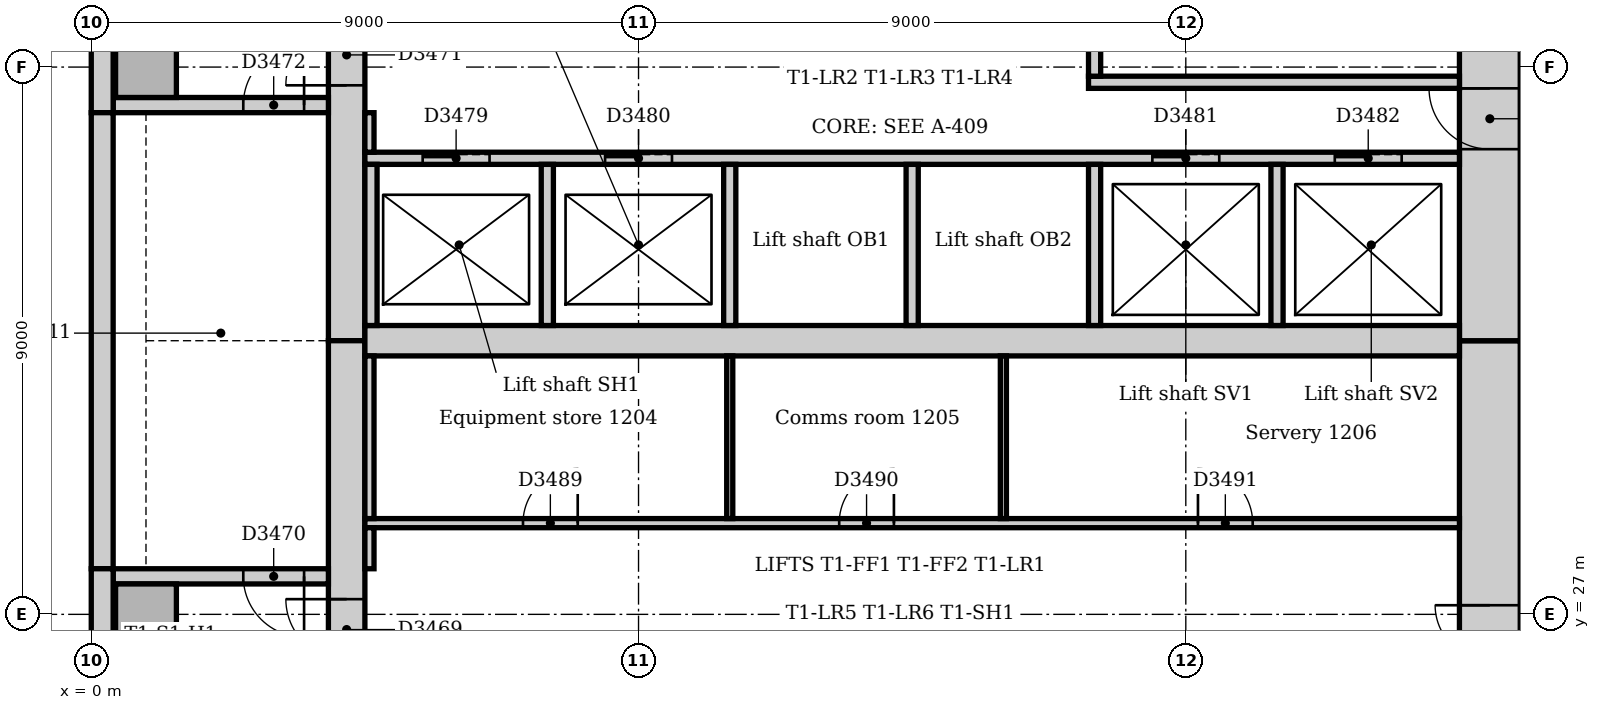
"""IFC4 building model, lengths in metres.
Left out: names, types, materials, properties, quantities, classifications, styles, units other than length and angle.
Written with IfcOpenShell. Run it as: python <this file> out.ifc"""

import sys

from ifc_helpers import new_model, si_unit, direction, frame, frame_2d, origin, origin_2d, place, context, subcontext, project, spatial, rectangle, extrude, element, fill, save


model = new_model("IFC4")
c1 = context("Model", 3, precision=1e-05, world=origin(), true_north=direction((0.0, 1.0)))
c2 = subcontext(c1, "Body", "Model", "MODEL_VIEW")
j1 = project(units=[si_unit("LENGTHUNIT", "METRE"), si_unit("PLANEANGLEUNIT", "RADIAN")], contexts=[c1])
p1 = place(None, origin())
s1 = spatial("IfcSite", under=j1, at=p1, CompositionType="ELEMENT")
p2 = place(p1, origin())
s2 = spatial("IfcBuilding", under=s1, at=p2, CompositionType="ELEMENT")
p3 = place(p2, frame((0.0, 0.0, 55.0)))
s3 = spatial("IfcBuildingStorey", under=s2, at=p3, CompositionType="ELEMENT", Elevation=55.0)
p4 = place(p3, frame((23.0, 21.0, 0.0), z_axis=(0.0, 0.0, 1.0), x_axis=(0.0, 1.0, 0.0)))
e1 = element("IfcWall", 1, at=p4, inside=s3, PredefinedType="SOLIDWALL", context=c2, shape_type="SweptSolid", body=[
    extrude(rectangle(XDim=10.5, YDim=1.0, at=frame_2d((5.25, 0.0))), origin(), (0.0, 0.0, 1.0), 4.0),
])
p5 = place(p4, frame((4.35, 0.0, 0.0)))
e2 = element("IfcOpeningElement", 2, at=p5, cuts=e1, PredefinedType="OPENING", context=c2, shape_type="SweptSolid", body=[
    extrude(rectangle(XDim=1.8, YDim=2.1, at=frame_2d((0.9, 1.05))), frame((0.0, 0.51, 0.0), z_axis=(0.0, -1.0, 0.0), x_axis=(1.0, 0.0, 0.0)), (0.0, 0.0, 1.0), 1.02),
])
p6 = place(p3, frame((23.0, 31.5, 0.0), z_axis=(0.0, 0.0, 1.0), x_axis=(0.0, 1.0, 0.0)))
e3 = element("IfcWall", 3, at=p6, inside=s3, PredefinedType="SOLIDWALL", context=c2, shape_type="SweptSolid", body=[
    extrude(rectangle(XDim=10.5, YDim=1.0, at=frame_2d((5.25, 0.0))), origin(), (0.0, 0.0, 1.0), 4.0),
])
p7 = place(p6, frame((3.15, 0.0, 0.0)))
e4 = element("IfcOpeningElement", 4, at=p7, cuts=e3, PredefinedType="OPENING", context=c2, shape_type="SweptSolid", body=[
    extrude(rectangle(XDim=1.0, YDim=2.1, at=frame_2d((0.5, 1.05))), frame((0.0, 0.51, 0.0), z_axis=(0.0, -1.0, 0.0), x_axis=(1.0, 0.0, 0.0)), (0.0, 0.0, 1.0), 1.02),
])
p8 = place(p6, frame((5.2, 0.0, 0.0)))
e5 = element("IfcOpeningElement", 5, at=p8, cuts=e3, PredefinedType="OPENING", context=c2, shape_type="SweptSolid", body=[
    extrude(rectangle(XDim=1.0, YDim=2.1, at=frame_2d((0.5, 1.05))), frame((0.0, 0.51, 0.0), z_axis=(0.0, -1.0, 0.0), x_axis=(1.0, 0.0, 0.0)), (0.0, 0.0, 1.0), 1.02),
])
p9 = place(p3, frame((4.2, 42.0, 0.0), z_axis=(0.0, 0.0, 1.0), x_axis=(0.0, -1.0, 0.0)))
e6 = element("IfcWall", 6, at=p9, inside=s3, PredefinedType="SOLIDWALL", context=c2, shape_type="SweptSolid", body=[
    extrude(rectangle(XDim=10.5, YDim=0.6, at=frame_2d((5.25, 0.0))), origin(), (0.0, 0.0, 1.0), 4.0),
])
p10 = place(p9, frame((5.3, 0.0, 0.0)))
e7 = element("IfcOpeningElement", 7, at=p10, cuts=e6, PredefinedType="OPENING", context=c2, shape_type="SweptSolid", body=[
    extrude(rectangle(XDim=1.0, YDim=2.1, at=frame_2d((0.5, 1.05))), frame((0.0, 0.31, 0.0), z_axis=(0.0, -1.0, 0.0), x_axis=(1.0, 0.0, 0.0)), (0.0, 0.0, 1.0), 0.62),
])
p11 = place(p3, frame((4.2, 31.5, 0.0), z_axis=(0.0, 0.0, 1.0), x_axis=(0.0, -1.0, 0.0)))
e8 = element("IfcWall", 8, at=p11, inside=s3, PredefinedType="SOLIDWALL", context=c2, shape_type="SweptSolid", body=[
    extrude(rectangle(XDim=10.5, YDim=0.6, at=frame_2d((5.25, 0.0))), origin(), (0.0, 0.0, 1.0), 4.0),
])
p12 = place(p11, frame((4.25, 0.0, 0.0)))
e9 = element("IfcOpeningElement", 9, at=p12, cuts=e8, PredefinedType="OPENING", context=c2, shape_type="SweptSolid", body=[
    extrude(rectangle(XDim=1.0, YDim=2.1, at=frame_2d((0.5, 1.05))), frame((0.0, 0.31, 0.0), z_axis=(0.0, -1.0, 0.0), x_axis=(1.0, 0.0, 0.0)), (0.0, 0.0, 1.0), 0.62),
])
p13 = place(p3, frame((4.5, 31.5, 0.0), z_axis=(0.0, 0.0, 1.0), x_axis=(1.0, 0.0, 0.0)))
e10 = element("IfcWall", 10, at=p13, inside=s3, PredefinedType="SOLIDWALL", context=c2, shape_type="SweptSolid", body=[
    extrude(rectangle(XDim=18.0, YDim=0.5, at=frame_2d((9.0, 0.0))), origin(), (0.0, 0.0, 1.0), 4.0),
])
p14 = place(p3, frame((3.9, 27.625, 0.0), z_axis=(0.0, 0.0, 1.0), x_axis=(-1.0, 0.0, 0.0)))
e11 = element("IfcWall", 11, at=p14, inside=s3, PredefinedType="SOLIDWALL", context=c2, shape_type="SweptSolid", body=[
    extrude(rectangle(XDim=3.54, YDim=0.25, at=frame_2d((1.77, 0.0))), origin(), (0.0, 0.0, 1.0), 4.0),
])
p15 = place(p14, frame((0.4, 0.0, 0.0)))
e12 = element("IfcOpeningElement", 12, at=p15, cuts=e11, PredefinedType="OPENING", context=c2, shape_type="SweptSolid", body=[
    extrude(rectangle(XDim=1.0, YDim=2.1, at=frame_2d((0.5, 1.05))), frame((0.0, 0.135, 0.0), z_axis=(0.0, -1.0, 0.0), x_axis=(1.0, 0.0, 0.0)), (0.0, 0.0, 1.0), 0.27),
])
p16 = place(p3, frame((0.36, 35.375, 0.0), z_axis=(0.0, 0.0, 1.0), x_axis=(1.0, 0.0, 0.0)))
e13 = element("IfcWall", 13, at=p16, inside=s3, PredefinedType="SOLIDWALL", context=c2, shape_type="SweptSolid", body=[
    extrude(rectangle(XDim=3.54, YDim=0.25, at=frame_2d((1.77, 0.0))), origin(), (0.0, 0.0, 1.0), 4.0),
])
p17 = place(p16, frame((2.14, 0.0, 0.0)))
e14 = element("IfcOpeningElement", 14, at=p17, cuts=e13, PredefinedType="OPENING", context=c2, shape_type="SweptSolid", body=[
    extrude(rectangle(XDim=1.0, YDim=2.1, at=frame_2d((0.5, 1.05))), frame((0.0, 0.135, 0.0), z_axis=(0.0, -1.0, 0.0), x_axis=(1.0, 0.0, 0.0)), (0.0, 0.0, 1.0), 0.27),
])
for number, where, z_axis, x_axis in (
    (15, (0.9, 27.0, 0.0), (0.0, 0.0, 1.0), (1.0, 0.0, 0.0)),
    (16, (0.9, 36.0, 0.0), (0.0, 0.0, 1.0), (1.0, 0.0, 0.0)),
):
    element("IfcColumn", number, at=place(p3, frame(where, z_axis=z_axis, x_axis=x_axis)), inside=s3, PredefinedType="COLUMN", context=c2, shape_type="SweptSolid", body=[
        extrude(rectangle(XDim=1.0, YDim=1.0, at=origin_2d()), origin(), (0.0, 0.0, 1.0), 4.0),
    ])
p18 = place(p3, frame((0.18, 40.757, 0.0), z_axis=(0.0, 0.0, 1.0), x_axis=(0.0, -1.0, 0.0)))
e17 = element("IfcWall", 17, at=p18, inside=s3, PredefinedType="STANDARD", context=c2, shape_type="SweptSolid", body=[
    extrude(rectangle(XDim=5.507, YDim=0.36, at=frame_2d((2.754, 0.0))), origin(), (0.0, 0.0, 1.0), 3.85),
])
p19 = place(p3, frame((0.18, 35.25, 0.0), z_axis=(0.0, 0.0, 1.0), x_axis=(0.0, -1.0, 0.0)))
e18 = element("IfcWall", 18, at=p19, inside=s3, PredefinedType="STANDARD", context=c2, shape_type="SweptSolid", body=[
    extrude(rectangle(XDim=7.5, YDim=0.36, at=frame_2d((3.75, 0.0))), origin(), (0.0, 0.0, 1.0), 3.85),
])
p20 = place(p3, frame((0.18, 27.75, 0.0), z_axis=(0.0, 0.0, 1.0), x_axis=(0.0, -1.0, 0.0)))
e19 = element("IfcWall", 19, at=p20, inside=s3, PredefinedType="STANDARD", context=c2, shape_type="SweptSolid", body=[
    extrude(rectangle(XDim=6.75, YDim=0.36, at=frame_2d((3.375, 0.0))), origin(), (0.0, 0.0, 1.0), 3.85),
])
p21 = place(p3, frame((16.4, 35.75, 0.0), z_axis=(0.0, 0.0, 1.0), x_axis=(1.0, 0.0, 0.0)))
e20 = element("IfcWall", 20, at=p21, inside=s3, PredefinedType="PARTITIONING", context=c2, shape_type="SweptSolid", body=[
    extrude(rectangle(XDim=6.1, YDim=0.2, at=frame_2d((3.05, 0.0))), origin(), (0.0, 0.0, 1.0), 3.85),
])
p22 = place(p3, frame((16.5, 35.85, 0.0), z_axis=(0.0, 0.0, 1.0), x_axis=(0.0, 1.0, 0.0)))
e21 = element("IfcWall", 21, at=p22, inside=s3, PredefinedType="PARTITIONING", context=c2, shape_type="SweptSolid", body=[
    extrude(rectangle(XDim=2.55, YDim=0.2, at=frame_2d((1.275, 0.0))), origin(), (0.0, 0.0, 1.0), 3.85),
])
p23 = place(p3, frame((4.5, 34.5, 0.0), z_axis=(0.0, 0.0, 1.0), x_axis=(1.0, 0.0, 0.0)))
e22 = element("IfcWall", 22, at=p23, inside=s3, PredefinedType="PARTITIONING", context=c2, shape_type="SweptSolid", body=[
    extrude(rectangle(XDim=18.0, YDim=0.2, at=frame_2d((9.0, 0.0))), origin(), (0.0, 0.0, 1.0), 3.85),
])
p24 = place(p23, frame((0.95, 0.0, 0.0)))
e23 = element("IfcOpeningElement", 23, at=p24, cuts=e22, PredefinedType="OPENING", context=c2, shape_type="SweptSolid", body=[
    extrude(rectangle(XDim=1.1, YDim=2.1, at=frame_2d((0.55, 1.05))), frame((0.0, 0.11, 0.0), z_axis=(0.0, -1.0, 0.0), x_axis=(1.0, 0.0, 0.0)), (0.0, 0.0, 1.0), 0.22),
])
p25 = place(p23, frame((3.95, 0.0, 0.0)))
e24 = element("IfcOpeningElement", 24, at=p25, cuts=e22, PredefinedType="OPENING", context=c2, shape_type="SweptSolid", body=[
    extrude(rectangle(XDim=1.1, YDim=2.1, at=frame_2d((0.55, 1.05))), frame((0.0, 0.11, 0.0), z_axis=(0.0, -1.0, 0.0), x_axis=(1.0, 0.0, 0.0)), (0.0, 0.0, 1.0), 0.22),
])
p26 = place(p23, frame((12.95, 0.0, 0.0)))
e25 = element("IfcOpeningElement", 25, at=p26, cuts=e22, PredefinedType="OPENING", context=c2, shape_type="SweptSolid", body=[
    extrude(rectangle(XDim=1.1, YDim=2.1, at=frame_2d((0.55, 1.05))), frame((0.0, 0.11, 0.0), z_axis=(0.0, -1.0, 0.0), x_axis=(1.0, 0.0, 0.0)), (0.0, 0.0, 1.0), 0.22),
])
p27 = place(p23, frame((15.95, 0.0, 0.0)))
e26 = element("IfcOpeningElement", 26, at=p27, cuts=e22, PredefinedType="OPENING", context=c2, shape_type="SweptSolid", body=[
    extrude(rectangle(XDim=1.1, YDim=2.1, at=frame_2d((0.55, 1.05))), frame((0.0, 0.11, 0.0), z_axis=(0.0, -1.0, 0.0), x_axis=(1.0, 0.0, 0.0)), (0.0, 0.0, 1.0), 0.22),
])
for number, where, z_axis, x_axis in (
    (27, (4.6, 31.75, 0.0), (0.0, 0.0, 1.0), (0.0, 1.0, 0.0)),
    (28, (7.5, 31.75, 0.0), (0.0, 0.0, 1.0), (0.0, 1.0, 0.0)),
    (29, (10.5, 31.75, 0.0), (0.0, 0.0, 1.0), (0.0, 1.0, 0.0)),
    (30, (13.5, 31.75, 0.0), (0.0, 0.0, 1.0), (0.0, 1.0, 0.0)),
    (31, (16.5, 31.75, 0.0), (0.0, 0.0, 1.0), (0.0, 1.0, 0.0)),
    (32, (19.5, 31.75, 0.0), (0.0, 0.0, 1.0), (0.0, 1.0, 0.0)),
):
    element("IfcWall", number, at=place(p3, frame(where, z_axis=z_axis, x_axis=x_axis)), inside=s3, PredefinedType="PARTITIONING", context=c2, shape_type="SweptSolid", body=[
        extrude(rectangle(XDim=2.65, YDim=0.2, at=frame_2d((1.325, 0.0))), origin(), (0.0, 0.0, 1.0), 3.85),
    ])
p28 = place(p3, frame((4.5, 28.5, 0.0), z_axis=(0.0, 0.0, 1.0), x_axis=(1.0, 0.0, 0.0)))
e33 = element("IfcWall", 33, at=p28, inside=s3, PredefinedType="PARTITIONING", context=c2, shape_type="SweptSolid", body=[
    extrude(rectangle(XDim=18.0, YDim=0.15, at=frame_2d((9.0, 0.0))), origin(), (0.0, 0.0, 1.0), 3.85),
])
p29 = place(p28, frame((2.6, 0.0, 0.0)))
e34 = element("IfcOpeningElement", 34, at=p29, cuts=e33, PredefinedType="OPENING", context=c2, shape_type="SweptSolid", body=[
    extrude(rectangle(XDim=0.9, YDim=2.1, at=frame_2d((0.45, 1.05))), frame((0.0, 0.085, 0.0), z_axis=(0.0, -1.0, 0.0), x_axis=(1.0, 0.0, 0.0)), (0.0, 0.0, 1.0), 0.17),
])
p30 = place(p28, frame((7.8, 0.0, 0.0)))
e35 = element("IfcOpeningElement", 35, at=p30, cuts=e33, PredefinedType="OPENING", context=c2, shape_type="SweptSolid", body=[
    extrude(rectangle(XDim=0.9, YDim=2.1, at=frame_2d((0.45, 1.05))), frame((0.0, 0.085, 0.0), z_axis=(0.0, -1.0, 0.0), x_axis=(1.0, 0.0, 0.0)), (0.0, 0.0, 1.0), 0.17),
])
p31 = place(p28, frame((13.7, 0.0, 0.0)))
e36 = element("IfcOpeningElement", 36, at=p31, cuts=e33, PredefinedType="OPENING", context=c2, shape_type="SweptSolid", body=[
    extrude(rectangle(XDim=0.9, YDim=2.1, at=frame_2d((0.45, 1.05))), frame((0.0, 0.085, 0.0), z_axis=(0.0, -1.0, 0.0), x_axis=(1.0, 0.0, 0.0)), (0.0, 0.0, 1.0), 0.17),
])
p32 = place(p3, frame((4.575, 27.75, 0.0), z_axis=(0.0, 0.0, 1.0), x_axis=(0.0, 1.0, 0.0)))
e37 = element("IfcWall", 37, at=p32, inside=s3, PredefinedType="PARTITIONING", context=c2, shape_type="SweptSolid", body=[
    extrude(rectangle(XDim=0.675, YDim=0.15, at=frame_2d((0.338, 0.0))), origin(), (0.0, 0.0, 1.0), 3.85),
])
p33 = place(p3, frame((4.575, 28.575, 0.0), z_axis=(0.0, 0.0, 1.0), x_axis=(0.0, 1.0, 0.0)))
e38 = element("IfcWall", 38, at=p33, inside=s3, PredefinedType="PARTITIONING", context=c2, shape_type="SweptSolid", body=[
    extrude(rectangle(XDim=2.675, YDim=0.15, at=frame_2d((1.337, 0.0))), origin(), (0.0, 0.0, 1.0), 3.85),
])
p34 = place(p3, frame((4.575, 34.6, 0.0), z_axis=(0.0, 0.0, 1.0), x_axis=(0.0, 1.0, 0.0)))
e39 = element("IfcWall", 39, at=p34, inside=s3, PredefinedType="PARTITIONING", context=c2, shape_type="SweptSolid", body=[
    extrude(rectangle(XDim=0.65, YDim=0.15, at=frame_2d((0.325, 0.0))), origin(), (0.0, 0.0, 1.0), 3.85),
])
for number, where, z_axis, x_axis in (
    (40, (10.5, 28.575, 0.0), (0.0, 0.0, 1.0), (0.0, 1.0, 0.0)),
    (41, (15.0, 28.575, 0.0), (0.0, 0.0, 1.0), (0.0, 1.0, 0.0)),
):
    element("IfcWall", number, at=place(p3, frame(where, z_axis=z_axis, x_axis=x_axis)), inside=s3, PredefinedType="PARTITIONING", context=c2, shape_type="SweptSolid", body=[
        extrude(rectangle(XDim=2.675, YDim=0.1, at=frame_2d((1.337, 0.0))), origin(), (0.0, 0.0, 1.0), 3.85),
    ])
p35 = place(p12, frame((1.0, 0.0, 0.0), z_axis=(0.0, 0.0, 1.0), x_axis=(-1.0, 0.0, 0.0)))
e42 = element("IfcDoor", 42, at=p35, inside=s3, OperationType="SINGLE_SWING_RIGHT", PredefinedType="DOOR", context=c2, shape_type="SweptSolid", body=[
    extrude(rectangle(XDim=1.0, YDim=2.1, at=frame_2d((0.5, 1.05))), frame((0.0, 0.025, 0.0), z_axis=(0.0, -1.0, 0.0), x_axis=(1.0, 0.0, 0.0)), (0.0, 0.0, 1.0), 0.05),
])
fill(e9, e42)
p36 = place(p15, origin())
e43 = element("IfcDoor", 43, at=p36, inside=s3, OperationType="SINGLE_SWING_LEFT", PredefinedType="DOOR", context=c2, shape_type="SweptSolid", body=[
    extrude(rectangle(XDim=1.0, YDim=2.1, at=frame_2d((0.5, 1.05))), frame((0.0, 0.025, 0.0), z_axis=(0.0, -1.0, 0.0), x_axis=(1.0, 0.0, 0.0)), (0.0, 0.0, 1.0), 0.05),
])
fill(e12, e43)
p37 = place(p10, frame((1.0, 0.0, 0.0), z_axis=(0.0, 0.0, 1.0), x_axis=(-1.0, 0.0, 0.0)))
e44 = element("IfcDoor", 44, at=p37, inside=s3, OperationType="SINGLE_SWING_LEFT", PredefinedType="DOOR", context=c2, shape_type="SweptSolid", body=[
    extrude(rectangle(XDim=1.0, YDim=2.1, at=frame_2d((0.5, 1.05))), frame((0.0, 0.025, 0.0), z_axis=(0.0, -1.0, 0.0), x_axis=(1.0, 0.0, 0.0)), (0.0, 0.0, 1.0), 0.05),
])
fill(e7, e44)
p38 = place(p17, origin())
e45 = element("IfcDoor", 45, at=p38, inside=s3, OperationType="SINGLE_SWING_RIGHT", PredefinedType="DOOR", context=c2, shape_type="SweptSolid", body=[
    extrude(rectangle(XDim=1.0, YDim=2.1, at=frame_2d((0.5, 1.05))), frame((0.0, 0.025, 0.0), z_axis=(0.0, -1.0, 0.0), x_axis=(1.0, 0.0, 0.0)), (0.0, 0.0, 1.0), 0.05),
])
fill(e14, e45)
p39 = place(p24, origin())
e46 = element("IfcDoor", 46, at=p39, inside=s3, OperationType="SLIDING_TO_LEFT", PredefinedType="DOOR", context=c2, shape_type="SweptSolid", body=[
    extrude(rectangle(XDim=1.1, YDim=2.1, at=frame_2d((0.55, 1.05))), frame((0.0, 0.025, 0.0), z_axis=(0.0, -1.0, 0.0), x_axis=(1.0, 0.0, 0.0)), (0.0, 0.0, 1.0), 0.05),
])
fill(e23, e46)
p40 = place(p25, origin())
e47 = element("IfcDoor", 47, at=p40, inside=s3, OperationType="SLIDING_TO_LEFT", PredefinedType="DOOR", context=c2, shape_type="SweptSolid", body=[
    extrude(rectangle(XDim=1.1, YDim=2.1, at=frame_2d((0.55, 1.05))), frame((0.0, 0.025, 0.0), z_axis=(0.0, -1.0, 0.0), x_axis=(1.0, 0.0, 0.0)), (0.0, 0.0, 1.0), 0.05),
])
fill(e24, e47)
p41 = place(p26, origin())
e48 = element("IfcDoor", 48, at=p41, inside=s3, OperationType="SLIDING_TO_LEFT", PredefinedType="DOOR", context=c2, shape_type="SweptSolid", body=[
    extrude(rectangle(XDim=1.1, YDim=2.1, at=frame_2d((0.55, 1.05))), frame((0.0, 0.025, 0.0), z_axis=(0.0, -1.0, 0.0), x_axis=(1.0, 0.0, 0.0)), (0.0, 0.0, 1.0), 0.05),
])
fill(e25, e48)
p42 = place(p27, origin())
e49 = element("IfcDoor", 49, at=p42, inside=s3, OperationType="SLIDING_TO_LEFT", PredefinedType="DOOR", context=c2, shape_type="SweptSolid", body=[
    extrude(rectangle(XDim=1.1, YDim=2.1, at=frame_2d((0.55, 1.05))), frame((0.0, 0.025, 0.0), z_axis=(0.0, -1.0, 0.0), x_axis=(1.0, 0.0, 0.0)), (0.0, 0.0, 1.0), 0.05),
])
fill(e26, e49)
p43 = place(p5, origin())
e50 = element("IfcDoor", 50, at=p43, inside=s3, OperationType="DOUBLE_DOOR_DOUBLE_SWING", PredefinedType="DOOR", context=c2, shape_type="SweptSolid", body=[
    extrude(rectangle(XDim=1.8, YDim=2.1, at=frame_2d((0.9, 1.05))), frame((0.0, 0.025, 0.0), z_axis=(0.0, -1.0, 0.0), x_axis=(1.0, 0.0, 0.0)), (0.0, 0.0, 1.0), 0.05),
])
fill(e2, e50)
p44 = place(p7, origin())
e51 = element("IfcDoor", 51, at=p44, inside=s3, OperationType="SINGLE_SWING_RIGHT", PredefinedType="DOOR", context=c2, shape_type="SweptSolid", body=[
    extrude(rectangle(XDim=1.0, YDim=2.1, at=frame_2d((0.5, 1.05))), frame((0.0, 0.025, 0.0), z_axis=(0.0, -1.0, 0.0), x_axis=(1.0, 0.0, 0.0)), (0.0, 0.0, 1.0), 0.05),
])
fill(e4, e51)
p45 = place(p29, origin())
e52 = element("IfcDoor", 52, at=p45, inside=s3, OperationType="SINGLE_SWING_RIGHT", PredefinedType="DOOR", context=c2, shape_type="SweptSolid", body=[
    extrude(rectangle(XDim=0.9, YDim=2.1, at=frame_2d((0.45, 1.05))), frame((0.0, 0.025, 0.0), z_axis=(0.0, -1.0, 0.0), x_axis=(1.0, 0.0, 0.0)), (0.0, 0.0, 1.0), 0.05),
])
fill(e34, e52)
p46 = place(p30, origin())
e53 = element("IfcDoor", 53, at=p46, inside=s3, OperationType="SINGLE_SWING_RIGHT", PredefinedType="DOOR", context=c2, shape_type="SweptSolid", body=[
    extrude(rectangle(XDim=0.9, YDim=2.1, at=frame_2d((0.45, 1.05))), frame((0.0, 0.025, 0.0), z_axis=(0.0, -1.0, 0.0), x_axis=(1.0, 0.0, 0.0)), (0.0, 0.0, 1.0), 0.05),
])
fill(e35, e53)
p47 = place(p31, origin())
e54 = element("IfcDoor", 54, at=p47, inside=s3, OperationType="SINGLE_SWING_LEFT", PredefinedType="DOOR", context=c2, shape_type="SweptSolid", body=[
    extrude(rectangle(XDim=0.9, YDim=2.1, at=frame_2d((0.45, 1.05))), frame((0.0, 0.025, 0.0), z_axis=(0.0, -1.0, 0.0), x_axis=(1.0, 0.0, 0.0)), (0.0, 0.0, 1.0), 0.05),
])
fill(e36, e54)
save(model, sys.argv[1])
